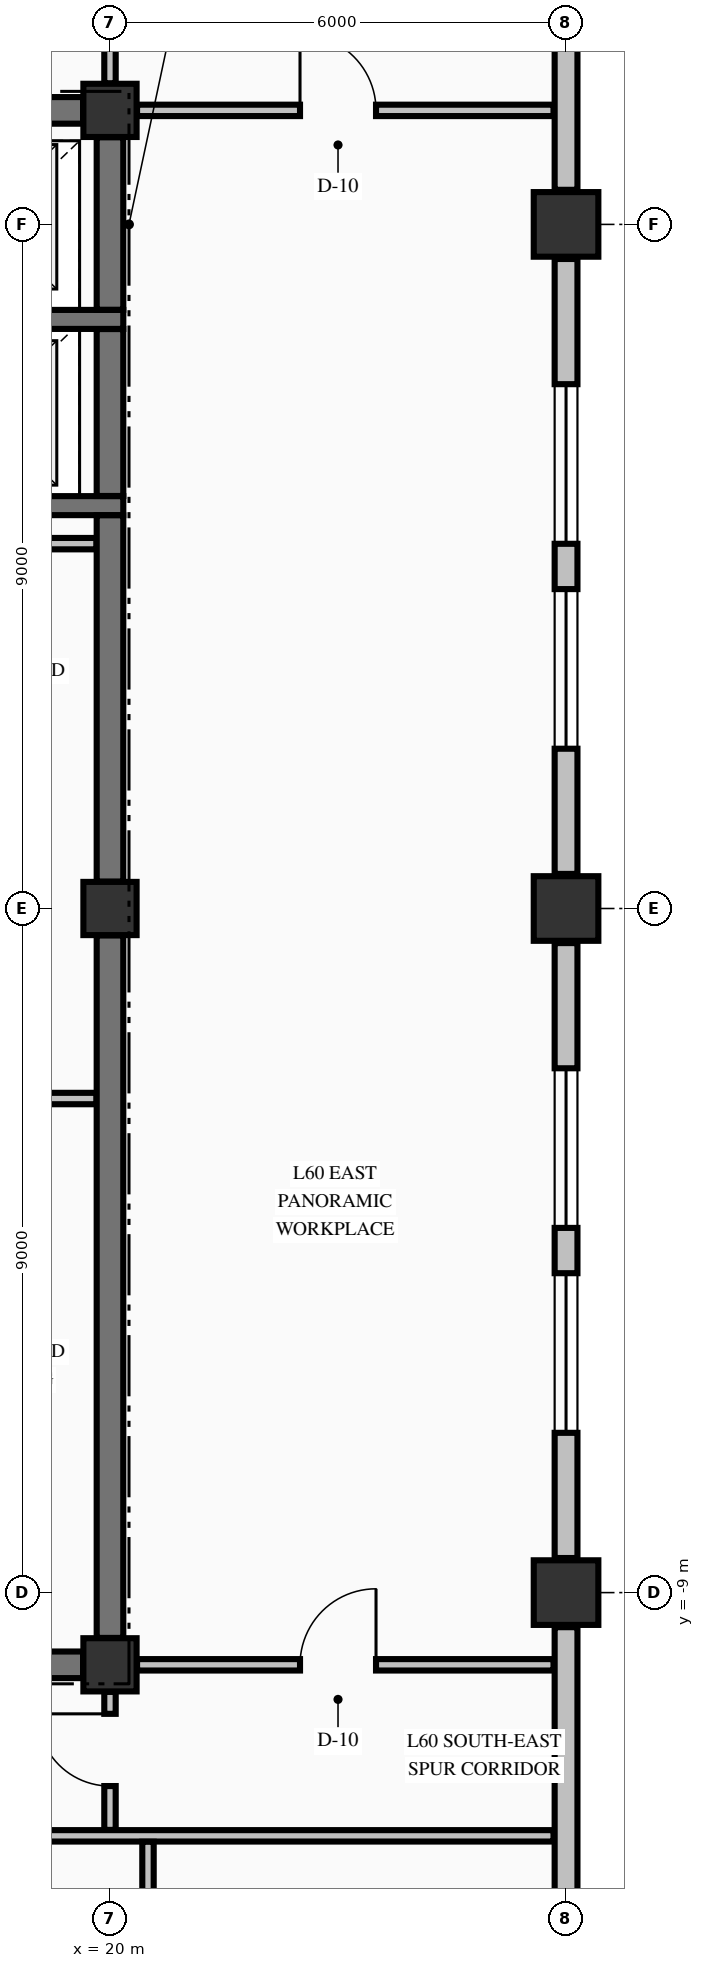
"""IFC4 building model, lengths in metres.
Left out: names, types, materials, properties, quantities, classifications, styles, units other than length and angle.
Written with IfcOpenShell. Run it as: python <this file> out.ifc"""

import sys

from ifc_helpers import new_model, si_unit, direction, frame, frame_2d, origin, origin_2d, place, context, subcontext, project, spatial, rectangle, extrude, element, fill, save


model = new_model("IFC4")
c1 = context("Model", 3, precision=1e-05, world=origin(), true_north=direction((0.0, 1.0)))
c2 = subcontext(c1, "Body", "Model", "MODEL_VIEW")
j1 = project(units=[si_unit("LENGTHUNIT", "METRE"), si_unit("PLANEANGLEUNIT", "RADIAN")], contexts=[c1])
p1 = place(None, origin())
s1 = spatial("IfcSite", under=j1, at=p1, CompositionType="ELEMENT")
p2 = place(p1, origin())
s2 = spatial("IfcBuilding", under=s1, at=p2, CompositionType="ELEMENT")
p3 = place(p2, frame((0.0, 0.0, 230.05)))
s3 = spatial("IfcBuildingStorey", under=s2, at=p3, CompositionType="ELEMENT", Elevation=230.05)
for number, where, z_axis, x_axis in (
    (1, (26.0, -9.0, -0.25), (0.0, 0.0, 1.0), (1.0, 0.0, 0.0)),
    (2, (26.0, 0.0, -0.25), (0.0, 0.0, 1.0), (1.0, 0.0, 0.0)),
    (3, (26.0, 9.0, -0.25), (0.0, 0.0, 1.0), (1.0, 0.0, 0.0)),
):
    element("IfcColumn", number, at=place(p3, frame(where, z_axis=z_axis, x_axis=x_axis)), inside=s3, PredefinedType="COLUMN", context=c2, shape_type="SweptSolid", body=[
        extrude(rectangle(XDim=0.85, YDim=0.85, at=origin_2d()), origin(), (0.0, 0.0, 1.0), 3.23),
    ])
for number, where, z_axis, x_axis in (
    (4, (20.0, -9.95, -0.25), (0.0, 0.0, 1.0), (1.0, 0.0, 0.0)),
    (5, (20.0, 10.5, -0.25), (0.0, 0.0, 1.0), (1.0, 0.0, 0.0)),
    (6, (20.0, 0.0, -0.25), (0.0, 0.0, 1.0), (1.0, 0.0, 0.0)),
):
    element("IfcColumn", number, at=place(p3, frame(where, z_axis=z_axis, x_axis=x_axis)), inside=s3, PredefinedType="COLUMN", context=c2, shape_type="SweptSolid", body=[
        extrude(rectangle(XDim=0.7, YDim=0.7, at=origin_2d()), origin(), (0.0, 0.0, 1.0), 3.23),
    ])
p4 = place(p3, frame((26.0, -17.545, 0.0), z_axis=(0.0, 0.0, 1.0), x_axis=(0.0, 1.0, 0.0)))
e7 = element("IfcWall", 7, at=p4, inside=s3, PredefinedType="STANDARD", context=c2, shape_type="SweptSolid", body=[
    extrude(rectangle(XDim=8.09, YDim=0.3, at=frame_2d((4.045, 0.0))), origin(), (0.0, 0.0, 1.0), 2.372),
])
p5 = place(p3, frame((26.0, -8.545, 0.0), z_axis=(0.0, 0.0, 1.0), x_axis=(0.0, 1.0, 0.0)))
e8 = element("IfcWall", 8, at=p5, inside=s3, PredefinedType="STANDARD", context=c2, shape_type="SweptSolid", body=[
    extrude(rectangle(XDim=8.09, YDim=0.3, at=frame_2d((4.045, 0.0))), origin(), (0.0, 0.0, 1.0), 2.372),
])
p6 = place(p5, frame((1.647, 0.0, 0.7)))
e9 = element("IfcOpeningElement", 9, at=p6, cuts=e8, PredefinedType="OPENING", context=c2, shape_type="SweptSolid", body=[
    extrude(rectangle(XDim=2.1, YDim=1.5, at=frame_2d((1.05, 0.75))), frame((0.0, 0.16, 0.0), z_axis=(0.0, -1.0, 0.0), x_axis=(1.0, 0.0, 0.0)), (0.0, 0.0, 1.0), 0.32),
])
p7 = place(p5, frame((4.343, 0.0, 0.7)))
e10 = element("IfcOpeningElement", 10, at=p7, cuts=e8, PredefinedType="OPENING", context=c2, shape_type="SweptSolid", body=[
    extrude(rectangle(XDim=2.1, YDim=1.5, at=frame_2d((1.05, 0.75))), frame((0.0, 0.16, 0.0), z_axis=(0.0, -1.0, 0.0), x_axis=(1.0, 0.0, 0.0)), (0.0, 0.0, 1.0), 0.32),
])
p8 = place(p3, frame((26.0, 0.455, 0.0), z_axis=(0.0, 0.0, 1.0), x_axis=(0.0, 1.0, 0.0)))
e11 = element("IfcWall", 11, at=p8, inside=s3, PredefinedType="STANDARD", context=c2, shape_type="SweptSolid", body=[
    extrude(rectangle(XDim=8.09, YDim=0.3, at=frame_2d((4.045, 0.0))), origin(), (0.0, 0.0, 1.0), 2.372),
])
p9 = place(p8, frame((1.647, 0.0, 0.7)))
e12 = element("IfcOpeningElement", 12, at=p9, cuts=e11, PredefinedType="OPENING", context=c2, shape_type="SweptSolid", body=[
    extrude(rectangle(XDim=2.1, YDim=1.5, at=frame_2d((1.05, 0.75))), frame((0.0, 0.16, 0.0), z_axis=(0.0, -1.0, 0.0), x_axis=(1.0, 0.0, 0.0)), (0.0, 0.0, 1.0), 0.32),
])
p10 = place(p8, frame((4.343, 0.0, 0.7)))
e13 = element("IfcOpeningElement", 13, at=p10, cuts=e11, PredefinedType="OPENING", context=c2, shape_type="SweptSolid", body=[
    extrude(rectangle(XDim=2.1, YDim=1.5, at=frame_2d((1.05, 0.75))), frame((0.0, 0.16, 0.0), z_axis=(0.0, -1.0, 0.0), x_axis=(1.0, 0.0, 0.0)), (0.0, 0.0, 1.0), 0.32),
])
p11 = place(p3, frame((26.0, 9.455, 0.0), z_axis=(0.0, 0.0, 1.0), x_axis=(0.0, 1.0, 0.0)))
e14 = element("IfcWall", 14, at=p11, inside=s3, PredefinedType="STANDARD", context=c2, shape_type="SweptSolid", body=[
    extrude(rectangle(XDim=8.09, YDim=0.3, at=frame_2d((4.045, 0.0))), origin(), (0.0, 0.0, 1.0), 2.372),
])
p12 = place(p3, frame((14.7, -9.95, 0.0), z_axis=(0.0, 0.0, 1.0), x_axis=(1.0, 0.0, 0.0)))
e15 = element("IfcWall", 15, at=p12, inside=s3, PredefinedType="SHEAR", context=c2, shape_type="SweptSolid", body=[
    extrude(rectangle(XDim=4.946, YDim=0.35, at=frame_2d((2.473, 0.0))), origin(), (0.0, 0.0, 1.0), 2.98),
])
p13 = place(p12, frame((0.825, 0.0, 0.0)))
e16 = element("IfcOpeningElement", 16, at=p13, cuts=e15, PredefinedType="OPENING", context=c2, shape_type="SweptSolid", body=[
    extrude(rectangle(XDim=0.95, YDim=2.15, at=frame_2d((0.475, 1.075))), frame((0.0, 0.185, 0.0), z_axis=(0.0, -1.0, 0.0), x_axis=(1.0, 0.0, 0.0)), (0.0, 0.0, 1.0), 0.37),
])
p14 = place(p12, frame((3.375, 0.0, 0.0)))
e17 = element("IfcOpeningElement", 17, at=p14, cuts=e15, PredefinedType="OPENING", context=c2, shape_type="SweptSolid", body=[
    extrude(rectangle(XDim=0.95, YDim=2.15, at=frame_2d((0.475, 1.075))), frame((0.0, 0.185, 0.0), z_axis=(0.0, -1.0, 0.0), x_axis=(1.0, 0.0, 0.0)), (0.0, 0.0, 1.0), 0.37),
])
for number, where, z_axis, x_axis in (
    (18, (17.025, 5.3, 0.0), (0.0, 0.0, 1.0), (1.0, 0.0, 0.0)),
    (19, (17.025, 7.75, 0.0), (0.0, 0.0, 1.0), (1.0, 0.0, 0.0)),
):
    element("IfcWall", number, at=place(p3, frame(where, z_axis=z_axis, x_axis=x_axis)), inside=s3, PredefinedType="SOLIDWALL", context=c2, shape_type="SweptSolid", body=[
        extrude(rectangle(XDim=3.15, YDim=0.25, at=frame_2d((1.575, 0.0))), origin(), (0.0, 0.0, 1.0), 2.98),
    ])
p15 = place(p3, frame((14.7, 10.5, 0.0), z_axis=(0.0, 0.0, 1.0), x_axis=(1.0, 0.0, 0.0)))
e20 = element("IfcWall", 20, at=p15, inside=s3, PredefinedType="SHEAR", context=c2, shape_type="SweptSolid", body=[
    extrude(rectangle(XDim=4.946, YDim=0.35, at=frame_2d((2.473, 0.0))), origin(), (0.0, 0.0, 1.0), 2.98),
])
p16 = place(p15, frame((0.7, 0.0, 0.0)))
e21 = element("IfcOpeningElement", 21, at=p16, cuts=e20, PredefinedType="OPENING", context=c2, shape_type="SweptSolid", body=[
    extrude(rectangle(XDim=1.1, YDim=2.15, at=frame_2d((0.55, 1.075))), frame((0.0, 0.185, 0.0), z_axis=(0.0, -1.0, 0.0), x_axis=(1.0, 0.0, 0.0)), (0.0, 0.0, 1.0), 0.37),
])
p17 = place(p3, frame((-20.075, -12.2, 0.0), z_axis=(0.0, 0.0, 1.0), x_axis=(1.0, 0.0, 0.0)))
e22 = element("IfcWall", 22, at=p17, inside=s3, PredefinedType="PARTITIONING", context=c2, shape_type="SweptSolid", body=[
    extrude(rectangle(XDim=45.91, YDim=0.15, at=frame_2d((22.955, 0.0))), origin(), (0.0, 0.0, 1.0), 2.98),
])
p18 = place(p17, frame((5.7, 0.0, 0.0)))
e23 = element("IfcOpeningElement", 23, at=p18, cuts=e22, PredefinedType="OPENING", context=c2, shape_type="SweptSolid", body=[
    extrude(rectangle(XDim=1.05, YDim=2.15, at=frame_2d((0.525, 1.075))), frame((0.0, 0.085, 0.0), z_axis=(0.0, -1.0, 0.0), x_axis=(1.0, 0.0, 0.0)), (0.0, 0.0, 1.0), 0.17),
])
p19 = place(p17, frame((17.3, 0.0, 0.0)))
e24 = element("IfcOpeningElement", 24, at=p19, cuts=e22, PredefinedType="OPENING", context=c2, shape_type="SweptSolid", body=[
    extrude(rectangle(XDim=1.05, YDim=2.15, at=frame_2d((0.525, 1.075))), frame((0.0, 0.085, 0.0), z_axis=(0.0, -1.0, 0.0), x_axis=(1.0, 0.0, 0.0)), (0.0, 0.0, 1.0), 0.17),
])
p20 = place(p17, frame((32.5, 0.0, 0.0)))
e25 = element("IfcOpeningElement", 25, at=p20, cuts=e22, PredefinedType="OPENING", context=c2, shape_type="SweptSolid", body=[
    extrude(rectangle(XDim=1.05, YDim=2.15, at=frame_2d((0.525, 1.075))), frame((0.0, 0.085, 0.0), z_axis=(0.0, -1.0, 0.0), x_axis=(1.0, 0.0, 0.0)), (0.0, 0.0, 1.0), 0.17),
])
p21 = place(p3, frame((20.356, -9.95, 0.0), z_axis=(0.0, 0.0, 1.0), x_axis=(1.0, 0.0, 0.0)))
e26 = element("IfcWall", 26, at=p21, inside=s3, PredefinedType="PARTITIONING", context=c2, shape_type="SweptSolid", body=[
    extrude(rectangle(XDim=5.479, YDim=0.15, at=frame_2d((2.74, 0.0))), origin(), (0.0, 0.0, 1.0), 2.98),
])
p22 = place(p21, frame((2.144, 0.0, 0.0)))
e27 = element("IfcOpeningElement", 27, at=p22, cuts=e26, PredefinedType="OPENING", context=c2, shape_type="SweptSolid", body=[
    extrude(rectangle(XDim=1.0, YDim=2.15, at=frame_2d((0.5, 1.075))), frame((0.0, 0.085, 0.0), z_axis=(0.0, -1.0, 0.0), x_axis=(1.0, 0.0, 0.0)), (0.0, 0.0, 1.0), 0.17),
])
p23 = place(p3, frame((14.878, -2.5, 0.0), z_axis=(0.0, 0.0, 1.0), x_axis=(1.0, 0.0, 0.0)))
e28 = element("IfcWall", 28, at=p23, inside=s3, PredefinedType="PARTITIONING", context=c2, shape_type="SweptSolid", body=[
    extrude(rectangle(XDim=4.944, YDim=0.15, at=frame_2d((2.472, 0.0))), origin(), (0.0, 0.0, 1.0), 2.98),
])
p24 = place(p23, frame((0.647, 0.0, 0.0)))
e29 = element("IfcOpeningElement", 29, at=p24, cuts=e28, PredefinedType="OPENING", context=c2, shape_type="SweptSolid", body=[
    extrude(rectangle(XDim=0.95, YDim=2.15, at=frame_2d((0.475, 1.075))), frame((0.0, 0.085, 0.0), z_axis=(0.0, -1.0, 0.0), x_axis=(1.0, 0.0, 0.0)), (0.0, 0.0, 1.0), 0.17),
])
p25 = place(p23, frame((3.197, 0.0, 0.0)))
e30 = element("IfcOpeningElement", 30, at=p25, cuts=e28, PredefinedType="OPENING", context=c2, shape_type="SweptSolid", body=[
    extrude(rectangle(XDim=0.95, YDim=2.15, at=frame_2d((0.475, 1.075))), frame((0.0, 0.085, 0.0), z_axis=(0.0, -1.0, 0.0), x_axis=(1.0, 0.0, 0.0)), (0.0, 0.0, 1.0), 0.17),
])
p26 = place(p3, frame((14.878, 4.8, 0.0), z_axis=(0.0, 0.0, 1.0), x_axis=(1.0, 0.0, 0.0)))
e31 = element("IfcWall", 31, at=p26, inside=s3, PredefinedType="PARTITIONING", context=c2, shape_type="SweptSolid", body=[
    extrude(rectangle(XDim=4.944, YDim=0.15, at=frame_2d((2.472, 0.0))), origin(), (0.0, 0.0, 1.0), 2.98),
])
p27 = place(p3, frame((20.356, 10.5, 0.0), z_axis=(0.0, 0.0, 1.0), x_axis=(1.0, 0.0, 0.0)))
e32 = element("IfcWall", 32, at=p27, inside=s3, PredefinedType="PARTITIONING", context=c2, shape_type="SweptSolid", body=[
    extrude(rectangle(XDim=5.479, YDim=0.15, at=frame_2d((2.74, 0.0))), origin(), (0.0, 0.0, 1.0), 2.98),
])
p28 = place(p27, frame((2.144, 0.0, 0.0)))
e33 = element("IfcOpeningElement", 33, at=p28, cuts=e32, PredefinedType="OPENING", context=c2, shape_type="SweptSolid", body=[
    extrude(rectangle(XDim=1.0, YDim=2.15, at=frame_2d((0.5, 1.075))), frame((0.0, 0.085, 0.0), z_axis=(0.0, -1.0, 0.0), x_axis=(1.0, 0.0, 0.0)), (0.0, 0.0, 1.0), 0.17),
])
p29 = place(p3, frame((20.0, -9.596, 0.0), z_axis=(0.0, 0.0, 1.0), x_axis=(0.0, 1.0, 0.0)))
e34 = element("IfcWall", 34, at=p29, inside=s3, PredefinedType="SHEAR", context=c2, shape_type="SweptSolid", body=[
    extrude(rectangle(XDim=9.242, YDim=0.35, at=frame_2d((4.621, 0.0))), origin(), (0.0, 0.0, 1.0), 2.98),
])
p30 = place(p3, frame((20.0, 0.354, 0.0), z_axis=(0.0, 0.0, 1.0), x_axis=(0.0, 1.0, 0.0)))
e35 = element("IfcWall", 35, at=p30, inside=s3, PredefinedType="SHEAR", context=c2, shape_type="SweptSolid", body=[
    extrude(rectangle(XDim=4.819, YDim=0.35, at=frame_2d((2.41, 0.0))), origin(), (0.0, 0.0, 1.0), 2.98),
])
p31 = place(p3, frame((20.0, 5.427, 0.0), z_axis=(0.0, 0.0, 1.0), x_axis=(0.0, 1.0, 0.0)))
e36 = element("IfcWall", 36, at=p31, inside=s3, PredefinedType="SHEAR", context=c2, shape_type="SweptSolid", body=[
    extrude(rectangle(XDim=2.196, YDim=0.35, at=frame_2d((1.098, 0.0))), origin(), (0.0, 0.0, 1.0), 2.98),
])
p32 = place(p3, frame((20.0, 7.877, 0.0), z_axis=(0.0, 0.0, 1.0), x_axis=(0.0, 1.0, 0.0)))
e37 = element("IfcWall", 37, at=p32, inside=s3, PredefinedType="SHEAR", context=c2, shape_type="SweptSolid", body=[
    extrude(rectangle(XDim=2.269, YDim=0.35, at=frame_2d((1.135, 0.0))), origin(), (0.0, 0.0, 1.0), 2.98),
])
p33 = place(p3, frame((20.0, -12.122, 0.0), z_axis=(0.0, 0.0, 1.0), x_axis=(0.0, 1.0, 0.0)))
e38 = element("IfcWall", 38, at=p33, inside=s3, PredefinedType="PARTITIONING", context=c2, shape_type="SweptSolid", body=[
    extrude(rectangle(XDim=1.816, YDim=0.15, at=frame_2d((0.908, 0.0))), origin(), (0.0, 0.0, 1.0), 2.98),
])
p34 = place(p33, frame((0.577, 0.0, 0.0)))
e39 = element("IfcOpeningElement", 39, at=p34, cuts=e38, PredefinedType="OPENING", context=c2, shape_type="SweptSolid", body=[
    extrude(rectangle(XDim=0.95, YDim=2.15, at=frame_2d((0.475, 1.075))), frame((0.0, 0.085, 0.0), z_axis=(0.0, -1.0, 0.0), x_axis=(1.0, 0.0, 0.0)), (0.0, 0.0, 1.0), 0.17),
])
p35 = place(p3, frame((20.0, 10.856, 0.0), z_axis=(0.0, 0.0, 1.0), x_axis=(0.0, 1.0, 0.0)))
e40 = element("IfcWall", 40, at=p35, inside=s3, PredefinedType="PARTITIONING", context=c2, shape_type="SweptSolid", body=[
    extrude(rectangle(XDim=2.416, YDim=0.15, at=frame_2d((1.208, 0.0))), origin(), (0.0, 0.0, 1.0), 2.98),
])
p36 = place(p35, frame((0.599, 0.0, 0.0)))
e41 = element("IfcOpeningElement", 41, at=p36, cuts=e40, PredefinedType="OPENING", context=c2, shape_type="SweptSolid", body=[
    extrude(rectangle(XDim=0.95, YDim=2.15, at=frame_2d((0.475, 1.075))), frame((0.0, 0.085, 0.0), z_axis=(0.0, -1.0, 0.0), x_axis=(1.0, 0.0, 0.0)), (0.0, 0.0, 1.0), 0.17),
])
p37 = place(p3, frame((20.5, -17.569, 0.0), z_axis=(0.0, 0.0, 1.0), x_axis=(0.0, 1.0, 0.0)))
e42 = element("IfcWall", 42, at=p37, inside=s3, PredefinedType="PARTITIONING", context=c2, shape_type="SweptSolid", body=[
    extrude(rectangle(XDim=5.291, YDim=0.15, at=frame_2d((2.646, 0.0))), origin(), (0.0, 0.0, 1.0), 2.98),
])
p38 = place(p6, origin())
e43 = element("IfcWindow", 43, at=p38, inside=s3, PartitioningType="SINGLE_PANEL", PredefinedType="WINDOW", context=c2, shape_type="SweptSolid", body=[
    extrude(rectangle(XDim=2.1, YDim=1.5, at=frame_2d((1.05, 0.75))), frame((0.0, 0.03, 0.0), z_axis=(0.0, -1.0, 0.0), x_axis=(1.0, 0.0, 0.0)), (0.0, 0.0, 1.0), 0.06),
])
fill(e9, e43)
p39 = place(p7, origin())
e44 = element("IfcWindow", 44, at=p39, inside=s3, PartitioningType="SINGLE_PANEL", PredefinedType="WINDOW", context=c2, shape_type="SweptSolid", body=[
    extrude(rectangle(XDim=2.1, YDim=1.5, at=frame_2d((1.05, 0.75))), frame((0.0, 0.03, 0.0), z_axis=(0.0, -1.0, 0.0), x_axis=(1.0, 0.0, 0.0)), (0.0, 0.0, 1.0), 0.06),
])
fill(e10, e44)
p40 = place(p9, origin())
e45 = element("IfcWindow", 45, at=p40, inside=s3, PartitioningType="SINGLE_PANEL", PredefinedType="WINDOW", context=c2, shape_type="SweptSolid", body=[
    extrude(rectangle(XDim=2.1, YDim=1.5, at=frame_2d((1.05, 0.75))), frame((0.0, 0.03, 0.0), z_axis=(0.0, -1.0, 0.0), x_axis=(1.0, 0.0, 0.0)), (0.0, 0.0, 1.0), 0.06),
])
fill(e12, e45)
p41 = place(p10, origin())
e46 = element("IfcWindow", 46, at=p41, inside=s3, PartitioningType="SINGLE_PANEL", PredefinedType="WINDOW", context=c2, shape_type="SweptSolid", body=[
    extrude(rectangle(XDim=2.1, YDim=1.5, at=frame_2d((1.05, 0.75))), frame((0.0, 0.03, 0.0), z_axis=(0.0, -1.0, 0.0), x_axis=(1.0, 0.0, 0.0)), (0.0, 0.0, 1.0), 0.06),
])
fill(e13, e46)
p42 = place(p34, origin())
e47 = element("IfcDoor", 47, at=p42, inside=s3, OperationType="SINGLE_SWING_RIGHT", PredefinedType="DOOR", context=c2, shape_type="SweptSolid", body=[
    extrude(rectangle(XDim=0.95, YDim=2.15, at=frame_2d((0.475, 1.075))), frame((0.0, 0.025, 0.0), z_axis=(0.0, -1.0, 0.0), x_axis=(1.0, 0.0, 0.0)), (0.0, 0.0, 1.0), 0.05),
])
fill(e39, e47)
p43 = place(p28, origin())
e48 = element("IfcDoor", 48, at=p43, inside=s3, OperationType="SINGLE_SWING_LEFT", PredefinedType="DOOR", context=c2, shape_type="SweptSolid", body=[
    extrude(rectangle(XDim=1.0, YDim=2.15, at=frame_2d((0.5, 1.075))), frame((0.0, 0.025, 0.0), z_axis=(0.0, -1.0, 0.0), x_axis=(1.0, 0.0, 0.0)), (0.0, 0.0, 1.0), 0.05),
])
fill(e33, e48)
p44 = place(p22, origin())
e49 = element("IfcDoor", 49, at=p44, inside=s3, OperationType="SINGLE_SWING_RIGHT", PredefinedType="DOOR", context=c2, shape_type="SweptSolid", body=[
    extrude(rectangle(XDim=1.0, YDim=2.15, at=frame_2d((0.5, 1.075))), frame((0.0, 0.025, 0.0), z_axis=(0.0, -1.0, 0.0), x_axis=(1.0, 0.0, 0.0)), (0.0, 0.0, 1.0), 0.05),
])
fill(e27, e49)
save(model, sys.argv[1])
